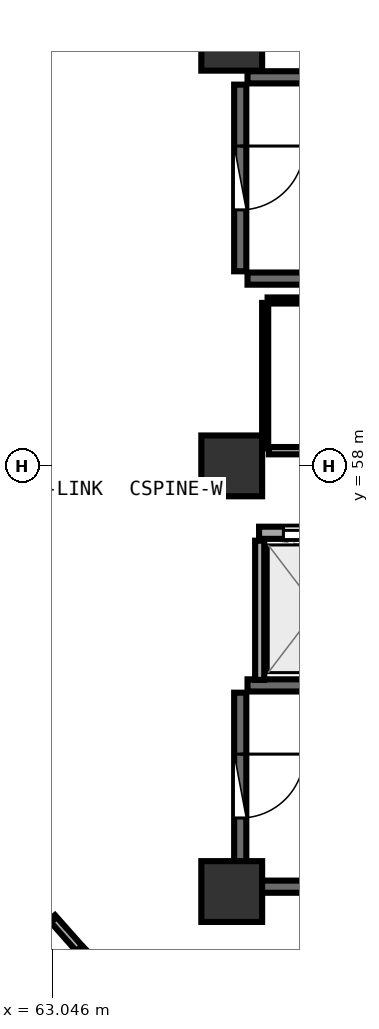
"""IFC4 building model, lengths in metres.
Left out: names, types, materials, properties, quantities, classifications, styles, units other than length and angle.
Written with IfcOpenShell. Run it as: python <this file> out.ifc"""

import sys

from ifc_helpers import new_model, si_unit, direction, frame, frame_2d, origin, origin_2d, place, context, subcontext, project, spatial, rectangle, extrude, element, fill, save


model = new_model("IFC4")
c1 = context("Model", 3, precision=1e-05, world=origin(), true_north=direction((0.0, 1.0)))
c2 = subcontext(c1, "Body", "Model", "MODEL_VIEW")
j1 = project(units=[si_unit("LENGTHUNIT", "METRE"), si_unit("PLANEANGLEUNIT", "RADIAN")], contexts=[c1])
p1 = place(None, origin())
s1 = spatial("IfcSite", under=j1, at=p1, CompositionType="ELEMENT")
p2 = place(p1, origin())
s2 = spatial("IfcBuilding", under=s1, at=p2, CompositionType="ELEMENT")
p3 = place(p2, frame((0.0, 0.0, 230.7)))
s3 = spatial("IfcBuildingStorey", under=s2, at=p3, CompositionType="ELEMENT", Elevation=230.7)
for number, where, z_axis, x_axis in (
    (1, (66.0, 51.0, 0.0), (0.0, 0.0, 1.0), (1.0, 0.0, 0.0)),
    (2, (66.0, 65.0, 0.0), (0.0, 0.0, 1.0), (1.0, 0.0, 0.0)),
    (3, (66.0, 58.0, 0.0), (0.0, 0.0, 1.0), (1.0, 0.0, 0.0)),
):
    element("IfcColumn", number, at=place(p3, frame(where, z_axis=z_axis, x_axis=x_axis)), inside=s3, PredefinedType="PILASTER", context=c2, shape_type="SweptSolid", body=[
        extrude(rectangle(XDim=1.0, YDim=1.0, at=origin_2d()), origin(), (0.0, 0.0, 1.0), 3.75),
    ])
for number, where, z_axis, x_axis in (
    (4, (66.26, 61.08, 0.0), (0.0, 0.0, 1.0), (1.0, 0.0, 0.0)),
    (5, (73.42, 64.39, 0.0), (0.0, 0.0, 1.0), (-1.0, 0.0, 0.0)),
):
    element("IfcWall", number, at=place(p3, frame(where, z_axis=z_axis, x_axis=x_axis)), inside=s3, PredefinedType="SHEAR", context=c2, shape_type="SweptSolid", body=[
        extrude(rectangle(XDim=7.16, YDim=0.2, at=frame_2d((3.58, 0.0))), origin(), (0.0, 0.0, 1.0), 3.49),
    ])
p4 = place(p3, frame((66.14, 64.27, 0.0), z_axis=(0.0, 0.0, 1.0), x_axis=(0.0, -1.0, 0.0)))
e6 = element("IfcWall", 6, at=p4, inside=s3, PredefinedType="SHEAR", context=c2, shape_type="SweptSolid", body=[
    extrude(rectangle(XDim=3.07, YDim=0.2, at=frame_2d((1.535, 0.0))), origin(), (0.0, 0.0, 1.0), 3.49),
])
p5 = place(p4, frame((1.01, 0.0, 0.0)))
e7 = element("IfcOpeningElement", 7, at=p5, cuts=e6, PredefinedType="OPENING", context=c2, shape_type="SweptSolid", body=[
    extrude(rectangle(XDim=1.05, YDim=2.1, at=frame_2d((0.525, 1.05))), frame((0.0, 0.11, 0.0), z_axis=(0.0, -1.0, 0.0), x_axis=(1.0, 0.0, 0.0)), (0.0, 0.0, 1.0), 0.22),
])
for number, where, z_axis, x_axis in (
    (8, (66.26, 51.08, 0.0), (0.0, 0.0, 1.0), (1.0, 0.0, 0.0)),
    (9, (73.42, 54.39, 0.0), (0.0, 0.0, 1.0), (-1.0, 0.0, 0.0)),
):
    element("IfcWall", number, at=place(p3, frame(where, z_axis=z_axis, x_axis=x_axis)), inside=s3, PredefinedType="SHEAR", context=c2, shape_type="SweptSolid", body=[
        extrude(rectangle(XDim=7.16, YDim=0.2, at=frame_2d((3.58, 0.0))), origin(), (0.0, 0.0, 1.0), 3.49),
    ])
p6 = place(p3, frame((66.14, 54.27, 0.0), z_axis=(0.0, 0.0, 1.0), x_axis=(0.0, -1.0, 0.0)))
e10 = element("IfcWall", 10, at=p6, inside=s3, PredefinedType="SHEAR", context=c2, shape_type="SweptSolid", body=[
    extrude(rectangle(XDim=3.07, YDim=0.2, at=frame_2d((1.535, 0.0))), origin(), (0.0, 0.0, 1.0), 3.49),
])
p7 = place(p6, frame((1.01, 0.0, 0.0)))
e11 = element("IfcOpeningElement", 11, at=p7, cuts=e10, PredefinedType="OPENING", context=c2, shape_type="SweptSolid", body=[
    extrude(rectangle(XDim=1.05, YDim=2.1, at=frame_2d((0.525, 1.05))), frame((0.0, 0.11, 0.0), z_axis=(0.0, -1.0, 0.0), x_axis=(1.0, 0.0, 0.0)), (0.0, 0.0, 1.0), 0.22),
])
p8 = place(p3, frame((66.45, 56.9, 0.0), z_axis=(0.0, 0.0, 1.0), x_axis=(1.0, 0.0, 0.0)))
e12 = element("IfcWall", 12, at=p8, inside=s3, PredefinedType="SOLIDWALL", context=c2, shape_type="SweptSolid", body=[
    extrude(rectangle(XDim=14.4, YDim=0.2, at=frame_2d((7.2, 0.0))), origin(), (0.0, 0.0, 1.0), 3.48),
])
p9 = place(p8, frame((0.4, 0.0, 0.0)))
e13 = element("IfcOpeningElement", 13, at=p9, cuts=e12, PredefinedType="OPENING", context=c2, shape_type="SweptSolid", body=[
    extrude(rectangle(XDim=1.1, YDim=2.1, at=frame_2d((0.55, 1.05))), frame((0.0, 0.11, 0.0), z_axis=(0.0, -1.0, 0.0), x_axis=(1.0, 0.0, 0.0)), (0.0, 0.0, 1.0), 0.22),
])
p10 = place(p8, frame((2.4, 0.0, 0.0)))
e14 = element("IfcOpeningElement", 14, at=p10, cuts=e12, PredefinedType="OPENING", context=c2, shape_type="SweptSolid", body=[
    extrude(rectangle(XDim=1.1, YDim=2.1, at=frame_2d((0.55, 1.05))), frame((0.0, 0.11, 0.0), z_axis=(0.0, -1.0, 0.0), x_axis=(1.0, 0.0, 0.0)), (0.0, 0.0, 1.0), 0.22),
])
p11 = place(p8, frame((4.4, 0.0, 0.0)))
e15 = element("IfcOpeningElement", 15, at=p11, cuts=e12, PredefinedType="OPENING", context=c2, shape_type="SweptSolid", body=[
    extrude(rectangle(XDim=1.1, YDim=2.1, at=frame_2d((0.55, 1.05))), frame((0.0, 0.11, 0.0), z_axis=(0.0, -1.0, 0.0), x_axis=(1.0, 0.0, 0.0)), (0.0, 0.0, 1.0), 0.22),
])
p12 = place(p3, frame((66.46, 54.48, 0.0), z_axis=(0.0, 0.0, 1.0), x_axis=(0.0, 1.0, 0.0)))
e16 = element("IfcWall", 16, at=p12, inside=s3, PredefinedType="PARTITIONING", context=c2, shape_type="SweptSolid", body=[
    extrude(rectangle(XDim=2.29, YDim=0.15, at=frame_2d((1.145, 0.0))), origin(), (0.0, 0.0, 1.0), 3.48),
])
p13 = place(p3, frame((66.61, 58.25, 0.0), z_axis=(0.0, 0.0, 1.0), x_axis=(1.0, 0.0, 0.0)))
e17 = element("IfcWall", 17, at=p13, inside=s3, PredefinedType="PARTITIONING", context=c2, shape_type="SweptSolid", body=[
    extrude(rectangle(XDim=3.33, YDim=0.12, at=frame_2d((1.665, 0.0))), origin(), (0.0, 0.0, 1.0), 3.48),
])
p14 = place(p13, frame((1.215, 0.0, 0.0)))
e18 = element("IfcOpeningElement", 18, at=p14, cuts=e17, PredefinedType="OPENING", context=c2, shape_type="SweptSolid", body=[
    extrude(rectangle(XDim=0.9, YDim=2.08, at=frame_2d((0.45, 1.04))), frame((0.0, 0.07, 0.0), z_axis=(0.0, -1.0, 0.0), x_axis=(1.0, 0.0, 0.0)), (0.0, 0.0, 1.0), 0.14),
])
p15 = place(p3, frame((64.352, 66.763, 0.0), z_axis=(0.0, 0.0, 1.0), x_axis=(-0.656587461417, -0.75424989593, 0.0)))
e19 = element("IfcWall", 19, at=p15, inside=s3, PredefinedType="PARTITIONING", context=c2, shape_type="SweptSolid", body=[
    extrude(rectangle(XDim=3.267, YDim=0.12, at=frame_2d((1.634, 0.0))), origin(), (0.0, 0.0, 1.0), 3.025),
])
p16 = place(p15, frame((1.184, 0.0, 0.0)))
e20 = element("IfcOpeningElement", 20, at=p16, cuts=e19, PredefinedType="OPENING", context=c2, shape_type="SweptSolid", body=[
    extrude(rectangle(XDim=0.9, YDim=2.08, at=frame_2d((0.45, 1.04))), frame((0.0, 0.07, 0.0), z_axis=(0.0, -1.0, 0.0), x_axis=(1.0, 0.0, 0.0)), (0.0, 0.0, 1.0), 0.14),
])
p17 = place(p3, frame((69.96, 60.72, 0.0), z_axis=(0.0, 0.0, 1.0), x_axis=(-1.0, 0.0, 0.0)))
e21 = element("IfcWall", 21, at=p17, inside=s3, PredefinedType="PARTITIONING", context=c2, shape_type="SweptSolid", body=[
    extrude(rectangle(XDim=3.37, YDim=0.1, at=frame_2d((1.685, 0.0))), origin(), (0.0, 0.0, 1.0), 3.48),
])
p18 = place(p3, frame((66.55, 60.68, 0.0), z_axis=(0.0, 0.0, 1.0), x_axis=(0.0, -1.0, 0.0)))
e22 = element("IfcWall", 22, at=p18, inside=s3, PredefinedType="PARTITIONING", context=c2, shape_type="SweptSolid", body=[
    extrude(rectangle(XDim=2.39, YDim=0.1, at=frame_2d((1.195, 0.0))), origin(), (0.0, 0.0, 1.0), 3.48),
])
p19 = place(p3, frame((63.044, 50.569, 0.0), z_axis=(0.0, 0.0, 1.0), x_axis=(0.663846659507, -0.74786871352, 0.0)))
e23 = element("IfcWall", 23, at=p19, inside=s3, PredefinedType="PLUMBINGWALL", context=c2, shape_type="SweptSolid", body=[
    extrude(rectangle(XDim=0.674, YDim=0.13, at=frame_2d((0.337, 0.0))), origin(), (0.0, 0.0, 1.0), 3.48),
])
p20 = place(p3, frame((63.519, 50.036, 0.0), z_axis=(0.0, 0.0, 1.0), x_axis=(0.704946592253, -0.70926039088, 0.0)))
e24 = element("IfcWall", 24, at=p20, inside=s3, PredefinedType="PLUMBINGWALL", context=c2, shape_type="SweptSolid", body=[
    extrude(rectangle(XDim=0.679, YDim=0.13, at=frame_2d((0.34, 0.0))), origin(), (0.0, 0.0, 1.0), 3.025),
])
p21 = place(p3, frame((60.603, 48.941, 0.0), z_axis=(0.0, 0.0, 1.0), x_axis=(0.828277690913, 0.560317826538, 0.0)))
e25 = element("IfcWall", 25, at=p21, inside=s3, PredefinedType="PLUMBINGWALL", context=c2, shape_type="SweptSolid", body=[
    extrude(rectangle(XDim=2.912, YDim=0.13, at=frame_2d((1.456, 0.0))), origin(), (0.0, 0.0, 1.0), 3.235),
])
p22 = place(p5, origin())
e26 = element("IfcDoor", 26, at=p22, inside=s3, OperationType="SINGLE_SWING_LEFT", PredefinedType="DOOR", context=c2, shape_type="SweptSolid", body=[
    extrude(rectangle(XDim=1.05, YDim=2.1, at=frame_2d((0.525, 1.05))), frame((0.0, 0.025, 0.0), z_axis=(0.0, -1.0, 0.0), x_axis=(1.0, 0.0, 0.0)), (0.0, 0.0, 1.0), 0.05),
])
fill(e7, e26)
p23 = place(p7, origin())
e27 = element("IfcDoor", 27, at=p23, inside=s3, OperationType="SINGLE_SWING_LEFT", PredefinedType="DOOR", context=c2, shape_type="SweptSolid", body=[
    extrude(rectangle(XDim=1.05, YDim=2.1, at=frame_2d((0.525, 1.05))), frame((0.0, 0.025, 0.0), z_axis=(0.0, -1.0, 0.0), x_axis=(1.0, 0.0, 0.0)), (0.0, 0.0, 1.0), 0.05),
])
fill(e11, e27)
p24 = place(p9, origin())
e28 = element("IfcDoor", 28, at=p24, inside=s3, OperationType="DOUBLE_DOOR_SLIDING", PredefinedType="DOOR", context=c2, shape_type="SweptSolid", body=[
    extrude(rectangle(XDim=1.1, YDim=2.1, at=frame_2d((0.55, 1.05))), frame((0.0, 0.025, 0.0), z_axis=(0.0, -1.0, 0.0), x_axis=(1.0, 0.0, 0.0)), (0.0, 0.0, 1.0), 0.05),
])
fill(e13, e28)
save(model, sys.argv[1])
